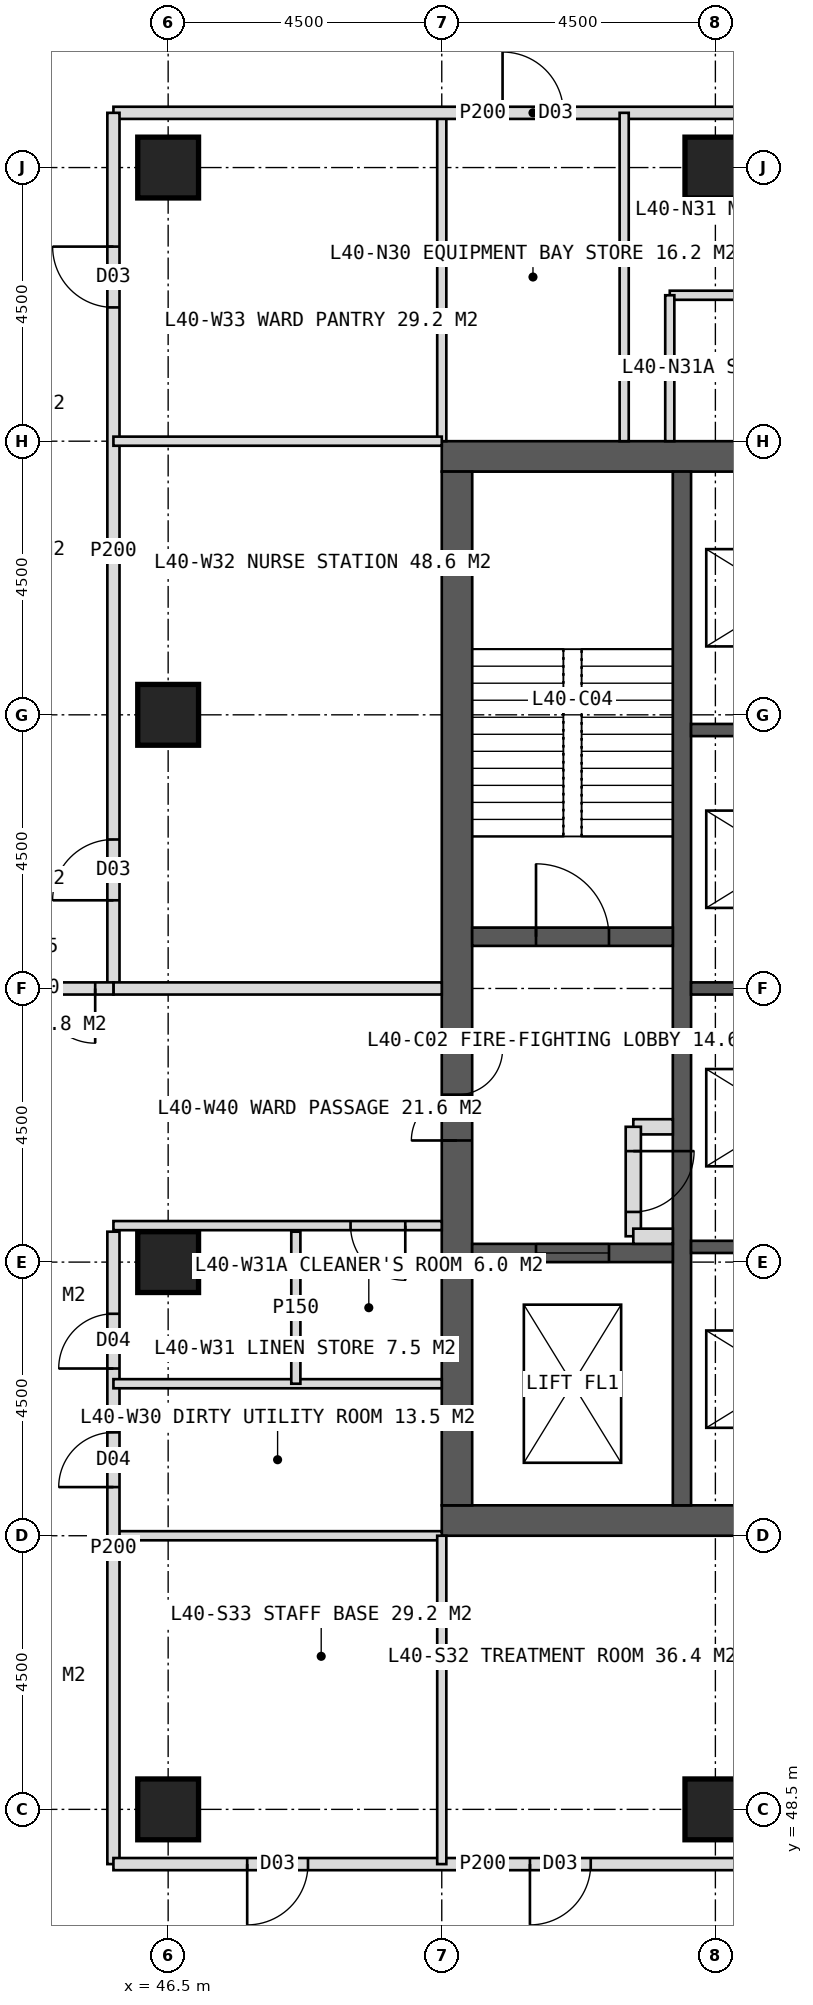
"""IFC4 building model, lengths in metres.
Left out: names, types, materials, properties, quantities, classifications, styles, units other than length and angle.
Written with IfcOpenShell. Run it as: python <this file> out.ifc"""

import sys

from ifc_helpers import new_model, si_unit, direction, frame, frame_2d, origin, origin_2d, place, context, subcontext, project, spatial, rectangle, hollow_rectangle, extrude, element, fill, save


model = new_model("IFC4")
c1 = context("Model", 3, precision=1e-05, world=origin(), true_north=direction((0.0, 1.0)))
c2 = subcontext(c1, "Body", "Model", "MODEL_VIEW")
j1 = project(units=[si_unit("LENGTHUNIT", "METRE"), si_unit("PLANEANGLEUNIT", "RADIAN")], contexts=[c1])
p1 = place(None, origin())
s1 = spatial("IfcSite", under=j1, at=p1, CompositionType="ELEMENT")
p2 = place(p1, origin())
s2 = spatial("IfcBuilding", under=s1, at=p2, CompositionType="ELEMENT")
p3 = place(p2, frame((0.0, 0.0, 168.0)))
s3 = spatial("IfcBuildingStorey", under=s2, at=p3, CompositionType="ELEMENT", Elevation=168.0)
p4 = place(p3, frame((51.0, 70.75, 0.0), z_axis=(0.0, 0.0, 1.0), x_axis=(1.0, 0.0, 0.0)))
e1 = element("IfcWall", 1, at=p4, inside=s3, PredefinedType="SHEAR", context=c2, shape_type="SweptSolid", body=[
    extrude(rectangle(XDim=18.0, YDim=0.5, at=frame_2d((9.0, 0.0))), origin(), (0.0, 0.0, 1.0), 4.0),
])
p5 = place(p4, frame((8.1, 0.0, 0.0)))
e2 = element("IfcOpeningElement", 2, at=p5, cuts=e1, PredefinedType="OPENING", context=c2, shape_type="SweptSolid", body=[
    extrude(rectangle(XDim=1.8, YDim=2.2, at=frame_2d((0.9, 1.1))), frame((0.0, 0.26, 0.0), z_axis=(0.0, -1.0, 0.0), x_axis=(1.0, 0.0, 0.0)), (0.0, 0.0, 1.0), 0.52),
])
p6 = place(p3, frame((51.0, 53.25, 0.0), z_axis=(0.0, 0.0, 1.0), x_axis=(1.0, 0.0, 0.0)))
e3 = element("IfcWall", 3, at=p6, inside=s3, PredefinedType="SHEAR", context=c2, shape_type="SweptSolid", body=[
    extrude(rectangle(XDim=18.0, YDim=0.5, at=frame_2d((9.0, 0.0))), origin(), (0.0, 0.0, 1.0), 4.0),
])
p7 = place(p6, frame((8.1, 0.0, 0.0)))
e4 = element("IfcOpeningElement", 4, at=p7, cuts=e3, PredefinedType="OPENING", context=c2, shape_type="SweptSolid", body=[
    extrude(rectangle(XDim=1.8, YDim=2.2, at=frame_2d((0.9, 1.1))), frame((0.0, 0.26, 0.0), z_axis=(0.0, -1.0, 0.0), x_axis=(1.0, 0.0, 0.0)), (0.0, 0.0, 1.0), 0.52),
])
p8 = place(p3, frame((51.25, 53.5, 0.0), z_axis=(0.0, 0.0, 1.0), x_axis=(0.0, 1.0, 0.0)))
e5 = element("IfcWall", 5, at=p8, inside=s3, PredefinedType="SHEAR", context=c2, shape_type="SweptSolid", body=[
    extrude(rectangle(XDim=17.0, YDim=0.5, at=frame_2d((8.5, 0.0))), origin(), (0.0, 0.0, 1.0), 4.0),
])
p9 = place(p8, frame((6.0, 0.0, 0.0)))
e6 = element("IfcOpeningElement", 6, at=p9, cuts=e5, PredefinedType="OPENING", context=c2, shape_type="SweptSolid", body=[
    extrude(rectangle(XDim=1.5, YDim=2.2, at=frame_2d((0.75, 1.1))), frame((0.0, 0.26, 0.0), z_axis=(0.0, -1.0, 0.0), x_axis=(1.0, 0.0, 0.0)), (0.0, 0.0, 1.0), 0.52),
])
p10 = place(p3, frame((54.95, 53.5, 0.0), z_axis=(0.0, 0.0, 1.0), x_axis=(0.0, 1.0, 0.0)))
e7 = element("IfcWall", 7, at=p10, inside=s3, PredefinedType="SHEAR", context=c2, shape_type="SweptSolid", body=[
    extrude(rectangle(XDim=17.0, YDim=0.3, at=frame_2d((8.5, 0.0))), origin(), (0.0, 0.0, 1.0), 4.0),
])
for number, where, z_axis, x_axis in (
    (8, (55.1, 57.75, 0.0), (0.0, 0.0, 1.0), (1.0, 0.0, 0.0)),
    (9, (55.1, 62.0, 0.0), (0.0, 0.0, 1.0), (1.0, 0.0, 0.0)),
    (10, (55.1, 66.25, 0.0), (0.0, 0.0, 1.0), (1.0, 0.0, 0.0)),
):
    element("IfcWall", number, at=place(p3, frame(where, z_axis=z_axis, x_axis=x_axis)), inside=s3, PredefinedType="SHEAR", context=c2, shape_type="SweptSolid", body=[
        extrude(rectangle(XDim=3.05, YDim=0.2, at=frame_2d((1.525, 0.0))), origin(), (0.0, 0.0, 1.0), 4.0),
    ])
p11 = place(p3, frame((51.5, 62.85, 0.0), z_axis=(0.0, 0.0, 1.0), x_axis=(1.0, 0.0, 0.0)))
e11 = element("IfcWall", 11, at=p11, inside=s3, PredefinedType="SHEAR", context=c2, shape_type="SweptSolid", body=[
    extrude(rectangle(XDim=3.3, YDim=0.3, at=frame_2d((1.65, 0.0))), origin(), (0.0, 0.0, 1.0), 4.0),
])
p12 = place(p11, frame((1.05, 0.0, 0.0)))
e12 = element("IfcOpeningElement", 12, at=p12, cuts=e11, PredefinedType="OPENING", context=c2, shape_type="SweptSolid", body=[
    extrude(rectangle(XDim=1.2, YDim=2.1, at=frame_2d((0.6, 1.05))), frame((0.0, 0.16, 0.0), z_axis=(0.0, -1.0, 0.0), x_axis=(1.0, 0.0, 0.0)), (0.0, 0.0, 1.0), 0.32),
])
p13 = place(p3, frame((51.5, 57.65, 0.0), z_axis=(0.0, 0.0, 1.0), x_axis=(1.0, 0.0, 0.0)))
e13 = element("IfcWall", 13, at=p13, inside=s3, PredefinedType="SHEAR", context=c2, shape_type="SweptSolid", body=[
    extrude(rectangle(XDim=3.3, YDim=0.3, at=frame_2d((1.65, 0.0))), origin(), (0.0, 0.0, 1.0), 4.0),
])
p14 = place(p13, frame((1.05, 0.0, 0.0)))
e14 = element("IfcOpeningElement", 14, at=p14, cuts=e13, PredefinedType="OPENING", context=c2, shape_type="SweptSolid", body=[
    extrude(rectangle(XDim=1.2, YDim=2.2, at=frame_2d((0.6, 1.1))), frame((0.0, 0.16, 0.0), z_axis=(0.0, -1.0, 0.0), x_axis=(1.0, 0.0, 0.0)), (0.0, 0.0, 1.0), 0.32),
])
for number, where, z_axis, x_axis in (
    (15, (46.5, 48.5, 0.0), (0.0, 0.0, 1.0), (1.0, 0.0, 0.0)),
    (16, (46.5, 75.5, 0.0), (0.0, 0.0, 1.0), (1.0, 0.0, 0.0)),
    (17, (55.5, 48.5, 0.0), (0.0, 0.0, 1.0), (1.0, 0.0, 0.0)),
    (18, (55.5, 75.5, 0.0), (0.0, 0.0, 1.0), (1.0, 0.0, 0.0)),
    (19, (46.5, 57.5, 0.0), (0.0, 0.0, 1.0), (1.0, 0.0, 0.0)),
    (20, (46.5, 66.5, 0.0), (0.0, 0.0, 1.0), (1.0, 0.0, 0.0)),
):
    element("IfcColumn", number, at=place(p3, frame(where, z_axis=z_axis, x_axis=x_axis)), inside=s3, PredefinedType="COLUMN", context=c2, shape_type="SweptSolid", body=[
        extrude(hollow_rectangle(XDim=1.0, YDim=1.0, WallThickness=0.1, at=origin_2d()), origin(), (0.0, 0.0, 1.0), 4.0),
    ])
p15 = place(p3, frame((51.0, 71.0, 0.0), z_axis=(0.0, 0.0, 1.0), x_axis=(0.0, 1.0, 0.0)))
e21 = element("IfcWall", 21, at=p15, inside=s3, PredefinedType="PARTITIONING", context=c2, shape_type="SweptSolid", body=[
    extrude(rectangle(XDim=5.4, YDim=0.15, at=frame_2d((2.7, 0.0))), origin(), (0.0, 0.0, 1.0), 3.75),
])
p16 = place(p3, frame((45.6, 76.4, 0.0), z_axis=(0.0, 0.0, 1.0), x_axis=(1.0, 0.0, 0.0)))
e22 = element("IfcWall", 22, at=p16, inside=s3, PredefinedType="PARTITIONING", context=c2, shape_type="SweptSolid", body=[
    extrude(rectangle(XDim=12.15, YDim=0.2, at=frame_2d((6.075, 0.0))), origin(), (0.0, 0.0, 1.0), 3.75),
])
p17 = place(p16, frame((6.4, 0.0, 0.0)))
e23 = element("IfcOpeningElement", 23, at=p17, cuts=e22, PredefinedType="OPENING", context=c2, shape_type="SweptSolid", body=[
    extrude(rectangle(XDim=1.0, YDim=2.1, at=frame_2d((0.5, 1.05))), frame((0.0, 0.11, 0.0), z_axis=(0.0, -1.0, 0.0), x_axis=(1.0, 0.0, 0.0)), (0.0, 0.0, 1.0), 0.22),
])
p18 = place(p16, frame((10.825, 0.0, 0.0)))
e24 = element("IfcOpeningElement", 24, at=p18, cuts=e22, PredefinedType="OPENING", context=c2, shape_type="SweptSolid", body=[
    extrude(rectangle(XDim=1.0, YDim=2.1, at=frame_2d((0.5, 1.05))), frame((0.0, 0.11, 0.0), z_axis=(0.0, -1.0, 0.0), x_axis=(1.0, 0.0, 0.0)), (0.0, 0.0, 1.0), 0.22),
])
p19 = place(p3, frame((54.0, 71.0, 0.0), z_axis=(0.0, 0.0, 1.0), x_axis=(0.0, 1.0, 0.0)))
e25 = element("IfcWall", 25, at=p19, inside=s3, PredefinedType="PARTITIONING", context=c2, shape_type="SweptSolid", body=[
    extrude(rectangle(XDim=5.4, YDim=0.15, at=frame_2d((2.7, 0.0))), origin(), (0.0, 0.0, 1.0), 3.75),
])
p20 = place(p3, frame((54.75, 73.4, 0.0), z_axis=(0.0, 0.0, 1.0), x_axis=(1.0, 0.0, 0.0)))
e26 = element("IfcWall", 26, at=p20, inside=s3, PredefinedType="PARTITIONING", context=c2, shape_type="SweptSolid", body=[
    extrude(rectangle(XDim=3.0, YDim=0.15, at=frame_2d((1.5, 0.0))), origin(), (0.0, 0.0, 1.0), 3.75),
])
p21 = place(p3, frame((54.75, 71.0, 0.0), z_axis=(0.0, 0.0, 1.0), x_axis=(0.0, 1.0, 0.0)))
e27 = element("IfcWall", 27, at=p21, inside=s3, PredefinedType="PARTITIONING", context=c2, shape_type="SweptSolid", body=[
    extrude(rectangle(XDim=2.4, YDim=0.15, at=frame_2d((1.2, 0.0))), origin(), (0.0, 0.0, 1.0), 3.75),
])
p22 = place(p3, frame((51.0, 53.0, 0.0), z_axis=(0.0, 0.0, 1.0), x_axis=(-1.0, 0.0, 0.0)))
e28 = element("IfcWall", 28, at=p22, inside=s3, PredefinedType="PARTITIONING", context=c2, shape_type="SweptSolid", body=[
    extrude(rectangle(XDim=5.4, YDim=0.15, at=frame_2d((2.7, 0.0))), origin(), (0.0, 0.0, 1.0), 3.75),
])
p23 = place(p3, frame((45.6, 47.6, 0.0), z_axis=(0.0, 0.0, 1.0), x_axis=(0.0, 1.0, 0.0)))
e29 = element("IfcWall", 29, at=p23, inside=s3, PredefinedType="PARTITIONING", context=c2, shape_type="SweptSolid", body=[
    extrude(rectangle(XDim=10.4, YDim=0.2, at=frame_2d((5.2, 0.0))), origin(), (0.0, 0.0, 1.0), 3.75),
])
p24 = place(p23, frame((6.2, 0.0, 0.0)))
e30 = element("IfcOpeningElement", 30, at=p24, cuts=e29, PredefinedType="OPENING", context=c2, shape_type="SweptSolid", body=[
    extrude(rectangle(XDim=0.9, YDim=2.1, at=frame_2d((0.45, 1.05))), frame((0.0, 0.11, 0.0), z_axis=(0.0, -1.0, 0.0), x_axis=(1.0, 0.0, 0.0)), (0.0, 0.0, 1.0), 0.22),
])
p25 = place(p23, frame((8.15, 0.0, 0.0)))
e31 = element("IfcOpeningElement", 31, at=p25, cuts=e29, PredefinedType="OPENING", context=c2, shape_type="SweptSolid", body=[
    extrude(rectangle(XDim=0.9, YDim=2.1, at=frame_2d((0.45, 1.05))), frame((0.0, 0.11, 0.0), z_axis=(0.0, -1.0, 0.0), x_axis=(1.0, 0.0, 0.0)), (0.0, 0.0, 1.0), 0.22),
])
p26 = place(p3, frame((45.6, 62.0, 0.0), z_axis=(0.0, 0.0, 1.0), x_axis=(0.0, 1.0, 0.0)))
e32 = element("IfcWall", 32, at=p26, inside=s3, PredefinedType="PARTITIONING", context=c2, shape_type="SweptSolid", body=[
    extrude(rectangle(XDim=14.4, YDim=0.2, at=frame_2d((7.2, 0.0))), origin(), (0.0, 0.0, 1.0), 3.75),
])
p27 = place(p26, frame((1.45, 0.0, 0.0)))
e33 = element("IfcOpeningElement", 33, at=p27, cuts=e32, PredefinedType="OPENING", context=c2, shape_type="SweptSolid", body=[
    extrude(rectangle(XDim=1.0, YDim=2.1, at=frame_2d((0.5, 1.05))), frame((0.0, 0.11, 0.0), z_axis=(0.0, -1.0, 0.0), x_axis=(1.0, 0.0, 0.0)), (0.0, 0.0, 1.0), 0.22),
])
p28 = place(p26, frame((11.2, 0.0, 0.0)))
e34 = element("IfcOpeningElement", 34, at=p28, cuts=e32, PredefinedType="OPENING", context=c2, shape_type="SweptSolid", body=[
    extrude(rectangle(XDim=1.0, YDim=2.1, at=frame_2d((0.5, 1.05))), frame((0.0, 0.11, 0.0), z_axis=(0.0, -1.0, 0.0), x_axis=(1.0, 0.0, 0.0)), (0.0, 0.0, 1.0), 0.22),
])
p29 = place(p3, frame((51.0, 58.1, 0.0), z_axis=(0.0, 0.0, 1.0), x_axis=(-1.0, 0.0, 0.0)))
e35 = element("IfcWall", 35, at=p29, inside=s3, PredefinedType="PARTITIONING", context=c2, shape_type="SweptSolid", body=[
    extrude(rectangle(XDim=5.4, YDim=0.15, at=frame_2d((2.7, 0.0))), origin(), (0.0, 0.0, 1.0), 3.75),
])
p30 = place(p29, frame((0.6, 0.0, 0.0)))
e36 = element("IfcOpeningElement", 36, at=p30, cuts=e35, PredefinedType="OPENING", context=c2, shape_type="SweptSolid", body=[
    extrude(rectangle(XDim=0.9, YDim=2.1, at=frame_2d((0.45, 1.05))), frame((0.0, 0.085, 0.0), z_axis=(0.0, -1.0, 0.0), x_axis=(1.0, 0.0, 0.0)), (0.0, 0.0, 1.0), 0.17),
])
p31 = place(p3, frame((51.0, 62.0, 0.0), z_axis=(0.0, 0.0, 1.0), x_axis=(-1.0, 0.0, 0.0)))
e37 = element("IfcWall", 37, at=p31, inside=s3, PredefinedType="SOLIDWALL", context=c2, shape_type="SweptSolid", body=[
    extrude(rectangle(XDim=5.4, YDim=0.2, at=frame_2d((2.7, 0.0))), origin(), (0.0, 0.0, 1.0), 2.95),
])
for number, where, z_axis, x_axis in (
    (38, (51.0, 55.5, 0.0), (0.0, 0.0, 1.0), (-1.0, 0.0, 0.0)),
    (39, (51.0, 71.0, 0.0), (0.0, 0.0, 1.0), (-1.0, 0.0, 0.0)),
):
    element("IfcWall", number, at=place(p3, frame(where, z_axis=z_axis, x_axis=x_axis)), inside=s3, PredefinedType="PARTITIONING", context=c2, shape_type="SweptSolid", body=[
        extrude(rectangle(XDim=5.4, YDim=0.15, at=frame_2d((2.7, 0.0))), origin(), (0.0, 0.0, 1.0), 3.75),
    ])
p32 = place(p3, frame((48.6, 55.5, 0.0), z_axis=(0.0, 0.0, 1.0), x_axis=(0.0, 1.0, 0.0)))
e40 = element("IfcWall", 40, at=p32, inside=s3, PredefinedType="PARTITIONING", context=c2, shape_type="SweptSolid", body=[
    extrude(rectangle(XDim=2.5, YDim=0.15, at=frame_2d((1.25, 0.0))), origin(), (0.0, 0.0, 1.0), 3.75),
])
p33 = place(p3, frame((57.75, 47.6, 0.0), z_axis=(0.0, 0.0, 1.0), x_axis=(-1.0, 0.0, 0.0)))
e41 = element("IfcWall", 41, at=p33, inside=s3, PredefinedType="PARTITIONING", context=c2, shape_type="SweptSolid", body=[
    extrude(rectangle(XDim=12.15, YDim=0.2, at=frame_2d((6.075, 0.0))), origin(), (0.0, 0.0, 1.0), 3.75),
])
p34 = place(p33, frame((4.3, 0.0, 0.0)))
e42 = element("IfcOpeningElement", 42, at=p34, cuts=e41, PredefinedType="OPENING", context=c2, shape_type="SweptSolid", body=[
    extrude(rectangle(XDim=1.0, YDim=2.1, at=frame_2d((0.5, 1.05))), frame((0.0, 0.11, 0.0), z_axis=(0.0, -1.0, 0.0), x_axis=(1.0, 0.0, 0.0)), (0.0, 0.0, 1.0), 0.22),
])
p35 = place(p33, frame((8.95, 0.0, 0.0)))
e43 = element("IfcOpeningElement", 43, at=p35, cuts=e41, PredefinedType="OPENING", context=c2, shape_type="SweptSolid", body=[
    extrude(rectangle(XDim=1.0, YDim=2.1, at=frame_2d((0.5, 1.05))), frame((0.0, 0.11, 0.0), z_axis=(0.0, -1.0, 0.0), x_axis=(1.0, 0.0, 0.0)), (0.0, 0.0, 1.0), 0.22),
])
p36 = place(p3, frame((51.0, 53.0, 0.0), z_axis=(0.0, 0.0, 1.0), x_axis=(0.0, -1.0, 0.0)))
e44 = element("IfcWall", 44, at=p36, inside=s3, PredefinedType="PARTITIONING", context=c2, shape_type="SweptSolid", body=[
    extrude(rectangle(XDim=5.4, YDim=0.15, at=frame_2d((2.7, 0.0))), origin(), (0.0, 0.0, 1.0), 3.75),
])
p37 = place(p3, frame((45.6, 62.0, 0.0), z_axis=(0.0, 0.0, 1.0), x_axis=(-1.0, 0.0, 0.0)))
e45 = element("IfcWall", 45, at=p37, inside=s3, PredefinedType="SOLIDWALL", context=c2, shape_type="SweptSolid", body=[
    extrude(rectangle(XDim=2.7, YDim=0.2, at=frame_2d((1.35, 0.0))), origin(), (0.0, 0.0, 1.0), 2.95),
])
p38 = place(p37, frame((0.3, 0.0, 0.0)))
e46 = element("IfcOpeningElement", 46, at=p38, cuts=e45, PredefinedType="OPENING", context=c2, shape_type="SweptSolid", body=[
    extrude(rectangle(XDim=1.8, YDim=2.2, at=frame_2d((0.9, 1.1))), frame((0.0, 0.11, 0.0), z_axis=(0.0, -1.0, 0.0), x_axis=(1.0, 0.0, 0.0)), (0.0, 0.0, 1.0), 0.22),
])
p39 = place(p3, frame((54.8, 59.725, 0.0), z_axis=(0.0, 0.0, 1.0), x_axis=(-1.0, 0.0, 0.0)))
e47 = element("IfcWall", 47, at=p39, inside=s3, PredefinedType="SOLIDWALL", context=c2, shape_type="SweptSolid", body=[
    extrude(rectangle(XDim=0.65, YDim=0.25, at=frame_2d((0.325, 0.0))), origin(), (0.0, 0.0, 1.0), 3.75),
])
p40 = place(p3, frame((54.15, 59.725, 0.0), z_axis=(0.0, 0.0, 1.0), x_axis=(0.0, -1.0, 0.0)))
e48 = element("IfcWall", 48, at=p40, inside=s3, PredefinedType="SOLIDWALL", context=c2, shape_type="SweptSolid", body=[
    extrude(rectangle(XDim=1.8, YDim=0.25, at=frame_2d((0.9, 0.0))), origin(), (0.0, 0.0, 1.0), 3.75),
])
p41 = place(p40, frame((0.4, 0.0, 0.0)))
e49 = element("IfcOpeningElement", 49, at=p41, cuts=e48, PredefinedType="OPENING", context=c2, shape_type="SweptSolid", body=[
    extrude(rectangle(XDim=1.0, YDim=2.1, at=frame_2d((0.5, 1.05))), frame((0.0, 0.135, 0.0), z_axis=(0.0, -1.0, 0.0), x_axis=(1.0, 0.0, 0.0)), (0.0, 0.0, 1.0), 0.27),
])
p42 = place(p3, frame((54.15, 57.925, 0.0), z_axis=(0.0, 0.0, 1.0), x_axis=(1.0, 0.0, 0.0)))
e50 = element("IfcWall", 50, at=p42, inside=s3, PredefinedType="SOLIDWALL", context=c2, shape_type="SweptSolid", body=[
    extrude(rectangle(XDim=0.65, YDim=0.25, at=frame_2d((0.325, 0.0))), origin(), (0.0, 0.0, 1.0), 3.75),
])
p43 = place(p17, origin())
e51 = element("IfcDoor", 51, at=p43, inside=s3, OperationType="SINGLE_SWING_LEFT", PredefinedType="DOOR", context=c2, shape_type="SweptSolid", body=[
    extrude(rectangle(XDim=1.0, YDim=2.1, at=frame_2d((0.5, 1.05))), frame((0.0, 0.025, 0.0), z_axis=(0.0, -1.0, 0.0), x_axis=(1.0, 0.0, 0.0)), (0.0, 0.0, 1.0), 0.05),
])
fill(e23, e51)
p44 = place(p24, origin())
e52 = element("IfcDoor", 52, at=p44, inside=s3, OperationType="SINGLE_SWING_LEFT", PredefinedType="DOOR", context=c2, shape_type="SweptSolid", body=[
    extrude(rectangle(XDim=0.9, YDim=2.1, at=frame_2d((0.45, 1.05))), frame((0.0, 0.025, 0.0), z_axis=(0.0, -1.0, 0.0), x_axis=(1.0, 0.0, 0.0)), (0.0, 0.0, 1.0), 0.05),
])
fill(e30, e52)
p45 = place(p30, origin())
e53 = element("IfcDoor", 53, at=p45, inside=s3, OperationType="SINGLE_SWING_LEFT", PredefinedType="DOOR", context=c2, shape_type="SweptSolid", body=[
    extrude(rectangle(XDim=0.9, YDim=2.1, at=frame_2d((0.45, 1.05))), frame((0.0, 0.025, 0.0), z_axis=(0.0, -1.0, 0.0), x_axis=(1.0, 0.0, 0.0)), (0.0, 0.0, 1.0), 0.05),
])
fill(e36, e53)
p46 = place(p25, origin())
e54 = element("IfcDoor", 54, at=p46, inside=s3, OperationType="SINGLE_SWING_LEFT", PredefinedType="DOOR", context=c2, shape_type="SweptSolid", body=[
    extrude(rectangle(XDim=0.9, YDim=2.1, at=frame_2d((0.45, 1.05))), frame((0.0, 0.025, 0.0), z_axis=(0.0, -1.0, 0.0), x_axis=(1.0, 0.0, 0.0)), (0.0, 0.0, 1.0), 0.05),
])
fill(e31, e54)
p47 = place(p27, origin())
e55 = element("IfcDoor", 55, at=p47, inside=s3, OperationType="SINGLE_SWING_LEFT", PredefinedType="DOOR", context=c2, shape_type="SweptSolid", body=[
    extrude(rectangle(XDim=1.0, YDim=2.1, at=frame_2d((0.5, 1.05))), frame((0.0, 0.025, 0.0), z_axis=(0.0, -1.0, 0.0), x_axis=(1.0, 0.0, 0.0)), (0.0, 0.0, 1.0), 0.05),
])
fill(e33, e55)
p48 = place(p28, origin())
e56 = element("IfcDoor", 56, at=p48, inside=s3, OperationType="SINGLE_SWING_RIGHT", PredefinedType="DOOR", context=c2, shape_type="SweptSolid", body=[
    extrude(rectangle(XDim=1.0, YDim=2.1, at=frame_2d((0.5, 1.05))), frame((0.0, 0.025, 0.0), z_axis=(0.0, -1.0, 0.0), x_axis=(1.0, 0.0, 0.0)), (0.0, 0.0, 1.0), 0.05),
])
fill(e34, e56)
p49 = place(p34, origin())
e57 = element("IfcDoor", 57, at=p49, inside=s3, OperationType="SINGLE_SWING_RIGHT", PredefinedType="DOOR", context=c2, shape_type="SweptSolid", body=[
    extrude(rectangle(XDim=1.0, YDim=2.1, at=frame_2d((0.5, 1.05))), frame((0.0, 0.025, 0.0), z_axis=(0.0, -1.0, 0.0), x_axis=(1.0, 0.0, 0.0)), (0.0, 0.0, 1.0), 0.05),
])
fill(e42, e57)
p50 = place(p35, origin())
e58 = element("IfcDoor", 58, at=p50, inside=s3, OperationType="SINGLE_SWING_RIGHT", PredefinedType="DOOR", context=c2, shape_type="SweptSolid", body=[
    extrude(rectangle(XDim=1.0, YDim=2.1, at=frame_2d((0.5, 1.05))), frame((0.0, 0.025, 0.0), z_axis=(0.0, -1.0, 0.0), x_axis=(1.0, 0.0, 0.0)), (0.0, 0.0, 1.0), 0.05),
])
fill(e43, e58)
p51 = place(p38, origin())
e59 = element("IfcDoor", 59, at=p51, inside=s3, OperationType="DOUBLE_DOOR_DOUBLE_SWING", PredefinedType="DOOR", context=c2, shape_type="SweptSolid", body=[
    extrude(rectangle(XDim=1.8, YDim=2.2, at=frame_2d((0.9, 1.1))), frame((0.0, 0.025, 0.0), z_axis=(0.0, -1.0, 0.0), x_axis=(1.0, 0.0, 0.0)), (0.0, 0.0, 1.0), 0.05),
])
fill(e46, e59)
p52 = place(p9, origin())
e60 = element("IfcDoor", 60, at=p52, inside=s3, OperationType="DOUBLE_DOOR_SINGLE_SWING", PredefinedType="DOOR", context=c2, shape_type="SweptSolid", body=[
    extrude(rectangle(XDim=1.5, YDim=2.2, at=frame_2d((0.75, 1.1))), frame((0.0, 0.025, 0.0), z_axis=(0.0, -1.0, 0.0), x_axis=(1.0, 0.0, 0.0)), (0.0, 0.0, 1.0), 0.05),
])
fill(e6, e60)
p53 = place(p12, origin())
e61 = element("IfcDoor", 61, at=p53, inside=s3, OperationType="SINGLE_SWING_LEFT", PredefinedType="DOOR", context=c2, shape_type="SweptSolid", body=[
    extrude(rectangle(XDim=1.2, YDim=2.1, at=frame_2d((0.6, 1.05))), frame((0.0, 0.025, 0.0), z_axis=(0.0, -1.0, 0.0), x_axis=(1.0, 0.0, 0.0)), (0.0, 0.0, 1.0), 0.05),
])
fill(e12, e61)
p54 = place(p14, origin())
e62 = element("IfcDoor", 62, at=p54, inside=s3, OperationType="SLIDING_TO_LEFT", PredefinedType="DOOR", context=c2, shape_type="SweptSolid", body=[
    extrude(rectangle(XDim=1.2, YDim=2.2, at=frame_2d((0.6, 1.1))), frame((0.0, 0.025, 0.0), z_axis=(0.0, -1.0, 0.0), x_axis=(1.0, 0.0, 0.0)), (0.0, 0.0, 1.0), 0.05),
])
fill(e14, e62)
p55 = place(p41, origin())
e63 = element("IfcDoor", 63, at=p55, inside=s3, OperationType="SINGLE_SWING_LEFT", PredefinedType="DOOR", context=c2, shape_type="SweptSolid", body=[
    extrude(rectangle(XDim=1.0, YDim=2.1, at=frame_2d((0.5, 1.05))), frame((0.0, 0.025, 0.0), z_axis=(0.0, -1.0, 0.0), x_axis=(1.0, 0.0, 0.0)), (0.0, 0.0, 1.0), 0.05),
])
fill(e49, e63)
save(model, sys.argv[1])
